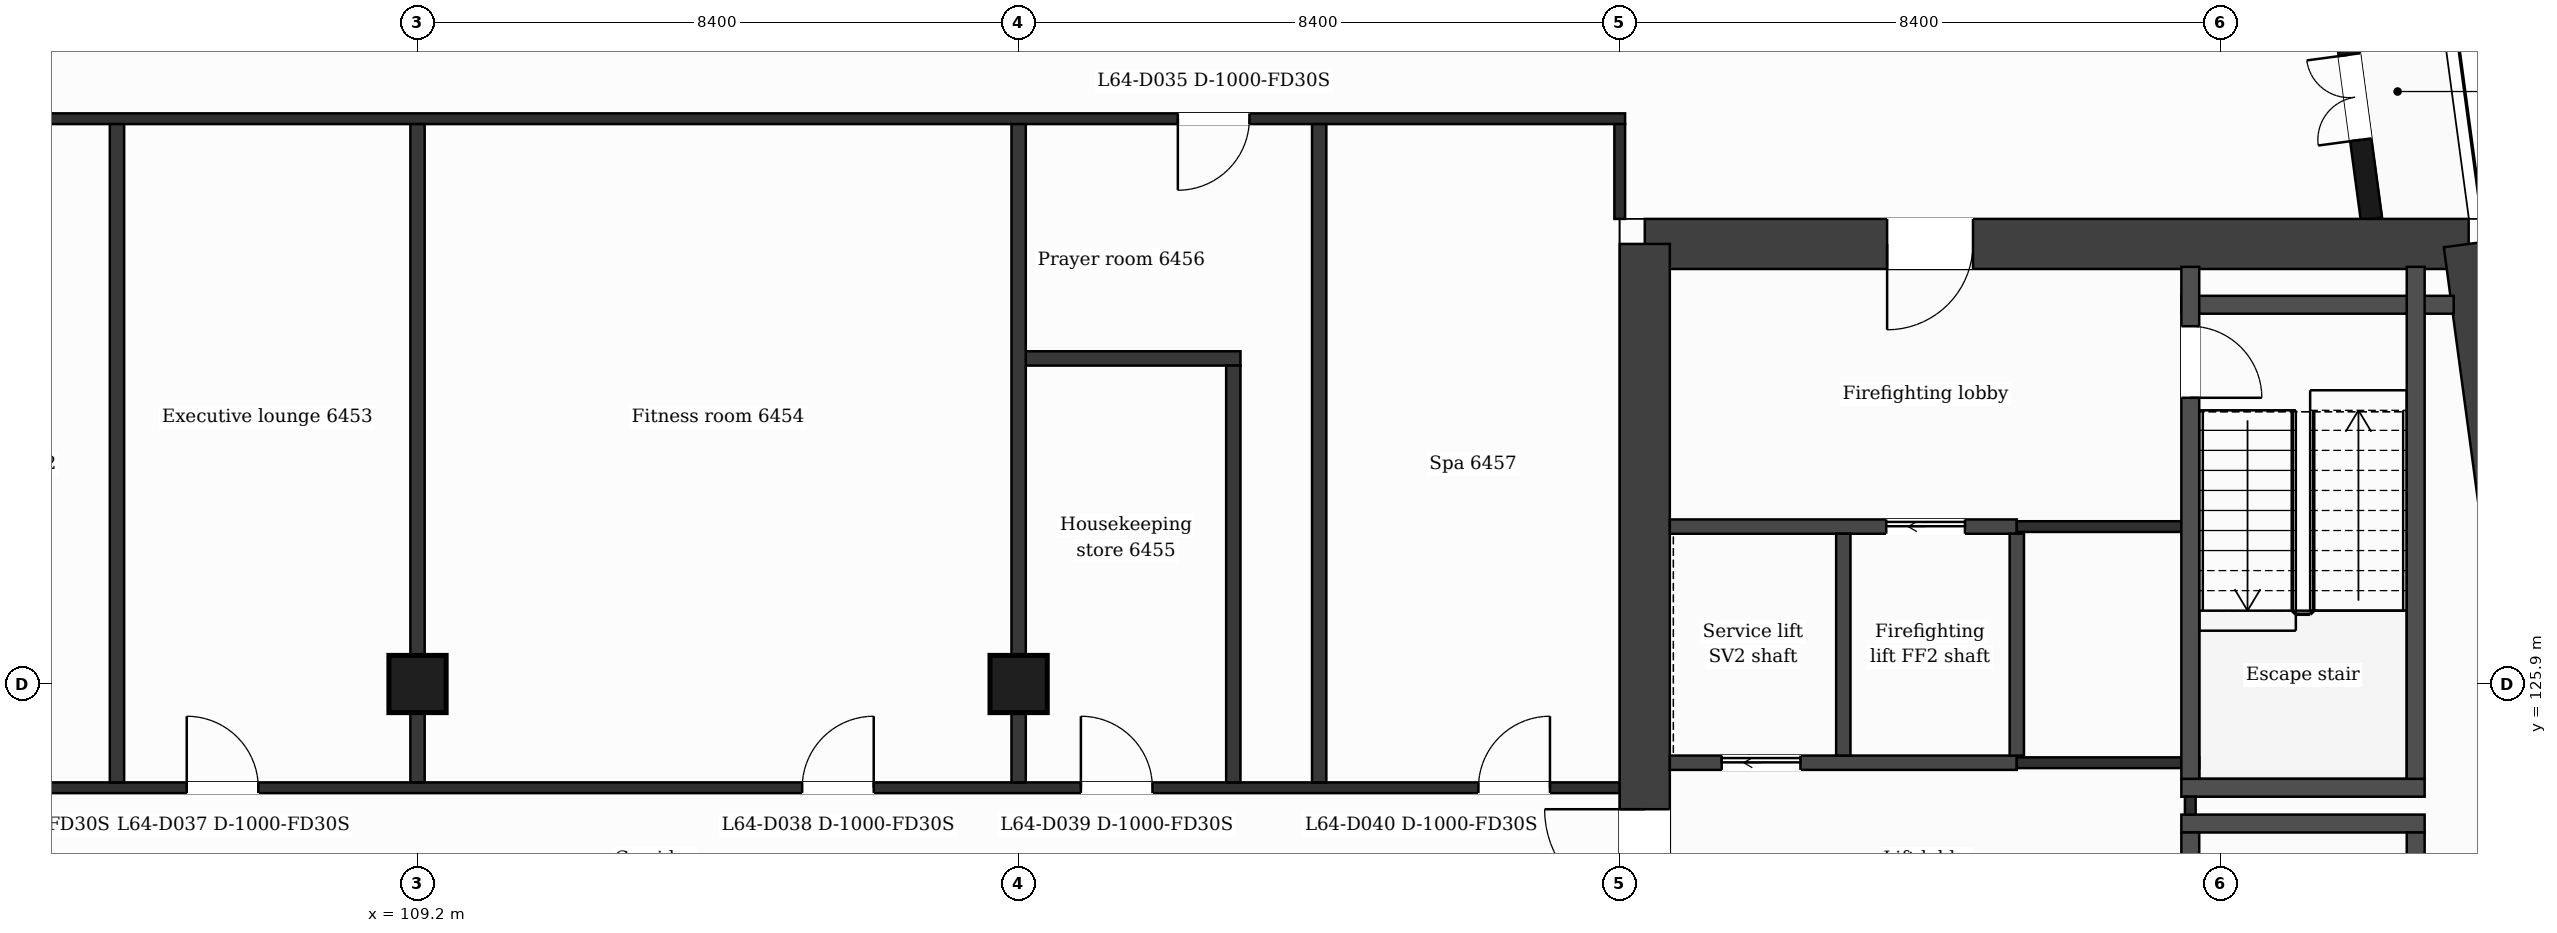
"""IFC4 building model, lengths in metres.
Left out: names, types, materials, properties, quantities, classifications, styles, units other than length and angle.
Written with IfcOpenShell. Run it as: python <this file> out.ifc"""

import sys

from ifc_helpers import new_model, si_unit, direction, frame, frame_2d, origin, origin_2d, place, context, subcontext, project, spatial, rectangle, extrude, element, fill, save


model = new_model("IFC4")
c1 = context("Model", 3, precision=1e-05, world=origin(), true_north=direction((0.0, 1.0)))
c2 = subcontext(c1, "Body", "Model", "MODEL_VIEW")
j1 = project(units=[si_unit("LENGTHUNIT", "METRE"), si_unit("PLANEANGLEUNIT", "RADIAN")], contexts=[c1])
p1 = place(None, origin())
s1 = spatial("IfcSite", under=j1, at=p1, CompositionType="ELEMENT")
p2 = place(p1, origin())
s2 = spatial("IfcBuilding", under=s1, at=p2, CompositionType="ELEMENT")
p3 = place(p2, frame((0.0, 0.0, 266.4)))
s3 = spatial("IfcBuildingStorey", under=s2, at=p3, CompositionType="ELEMENT", Elevation=266.4)
p4 = place(p3, frame((126.35, 132.05, 0.0), z_axis=(0.0, 0.0, 1.0), x_axis=(1.0, 0.0, 0.0)))
e1 = element("IfcWall", 1, at=p4, inside=s3, PredefinedType="SHEAR", context=c2, shape_type="SweptSolid", body=[
    extrude(rectangle(XDim=11.513, YDim=0.7, at=frame_2d((5.757, 0.0))), origin(), (0.0, 0.0, 1.0), 3.7),
])
p5 = place(p4, frame((3.386, 0.0, 0.0)))
e2 = element("IfcOpeningElement", 2, at=p5, cuts=e1, PredefinedType="OPENING", context=c2, shape_type="SweptSolid", body=[
    extrude(rectangle(XDim=1.2, YDim=2.1, at=frame_2d((0.6, 1.05))), frame((0.0, 0.36, 0.0), z_axis=(0.0, -1.0, 0.0), x_axis=(1.0, 0.0, 0.0)), (0.0, 0.0, 1.0), 0.72),
])
p6 = place(p3, frame((137.863, 132.05, 0.0), z_axis=(0.0, 0.0, 1.0), x_axis=(0.133406218907, -0.991061441464, 0.0)))
e3 = element("IfcWall", 3, at=p6, inside=s3, PredefinedType="SHEAR", context=c2, shape_type="SweptSolid", body=[
    extrude(rectangle(XDim=21.492, YDim=0.7, at=frame_2d((10.746, 0.0))), origin(), (0.0, 0.0, 1.0), 3.7),
])
p7 = place(p3, frame((126.35, 110.75, 0.0), z_axis=(0.0, 0.0, 1.0), x_axis=(0.0, 1.0, 0.0)))
e4 = element("IfcWall", 4, at=p7, inside=s3, PredefinedType="SHEAR", context=c2, shape_type="SweptSolid", body=[
    extrude(rectangle(XDim=21.3, YDim=0.7, at=frame_2d((10.65, 0.0))), origin(), (0.0, 0.0, 1.0), 3.7),
])
p8 = place(p7, frame((12.0, 0.0, 0.0)))
e5 = element("IfcOpeningElement", 5, at=p8, cuts=e4, PredefinedType="OPENING", context=c2, shape_type="SweptSolid", body=[
    extrude(rectangle(XDim=1.4, YDim=2.1, at=frame_2d((0.7, 1.05))), frame((0.0, 0.36, 0.0), z_axis=(0.0, -1.0, 0.0), x_axis=(1.0, 0.0, 0.0)), (0.0, 0.0, 1.0), 0.72),
])
for number, where, z_axis, x_axis in (
    (6, (109.2, 125.9, 0.0), (0.0, 0.0, 1.0), (1.0, 0.0, 0.0)),
    (7, (117.6, 125.9, 0.0), (0.0, 0.0, 1.0), (1.0, 0.0, 0.0)),
):
    element("IfcColumn", number, at=place(p3, frame(where, z_axis=z_axis, x_axis=x_axis)), inside=s3, PredefinedType="COLUMN", context=c2, shape_type="SweptSolid", body=[
        extrude(rectangle(XDim=0.8, YDim=0.8, at=origin_2d()), origin(), (0.0, 0.0, 1.0), 3.7),
    ])
p9 = place(p3, frame((136.504, 132.4, 0.0), z_axis=(0.0, 0.0, 1.0), x_axis=(-0.133399697462, 0.99106231929, 0.0)))
e8 = element("IfcWall", 8, at=p9, inside=s3, PredefinedType="SOLIDWALL", context=c2, shape_type="SweptSolid", body=[
    extrude(rectangle(XDim=6.74, YDim=0.3, at=frame_2d((3.37, 0.0))), origin(), (0.0, 0.0, 1.0), 3.38),
])
p10 = place(p9, frame((1.115, 0.0, 0.0)))
e9 = element("IfcOpeningElement", 9, at=p10, cuts=e8, PredefinedType="OPENING", context=c2, shape_type="SweptSolid", body=[
    extrude(rectangle(XDim=1.2, YDim=2.4, at=frame_2d((0.6, 1.2))), frame((0.0, 0.16, 0.0), z_axis=(0.0, -1.0, 0.0), x_axis=(1.0, 0.0, 0.0)), (0.0, 0.0, 1.0), 0.32),
])
p11 = place(p9, frame((3.835, 0.0, 0.9)))
e10 = element("IfcOpeningElement", 10, at=p11, cuts=e8, PredefinedType="OPENING", context=c2, shape_type="SweptSolid", body=[
    extrude(rectangle(XDim=2.4, YDim=2.1, at=frame_2d((1.2, 1.05))), frame((0.0, 0.16, 0.0), z_axis=(0.0, -1.0, 0.0), x_axis=(1.0, 0.0, 0.0)), (0.0, 0.0, 1.0), 0.32),
])
for number, where, z_axis, x_axis in (
    (11, (133.848, 123.95, 0.0), (0.0, 0.0, 1.0), (1.0, 0.0, 0.0)),
    (12, (133.848, 124.45, 0.0), (0.0, 0.0, 1.0), (1.0, 0.0, 0.0)),
):
    element("IfcWall", number, at=place(p3, frame(where, z_axis=z_axis, x_axis=x_axis)), inside=s3, PredefinedType="PARTITIONING", context=c2, shape_type="SweptSolid", body=[
        extrude(rectangle(XDim=3.4, YDim=0.25, at=frame_2d((1.7, 0.0))), origin(), (0.0, 0.0, 1.0), 3.38),
    ])
p12 = place(p3, frame((100.8, 124.45, 0.0), z_axis=(0.0, 0.0, 1.0), x_axis=(1.0, 0.0, 0.0)))
e13 = element("IfcWall", 13, at=p12, inside=s3, PredefinedType="PARTITIONING", context=c2, shape_type="SweptSolid", body=[
    extrude(rectangle(XDim=25.2, YDim=0.15, at=frame_2d((12.6, 0.0))), origin(), (0.0, 0.0, 1.0), 3.38),
])
p13 = place(p12, frame((0.975, 0.0, 0.0)))
e14 = element("IfcOpeningElement", 14, at=p13, cuts=e13, PredefinedType="OPENING", context=c2, shape_type="SweptSolid", body=[
    extrude(rectangle(XDim=1.0, YDim=2.1, at=frame_2d((0.5, 1.05))), frame((0.0, 0.085, 0.0), z_axis=(0.0, -1.0, 0.0), x_axis=(1.0, 0.0, 0.0)), (0.0, 0.0, 1.0), 0.17),
])
p14 = place(p12, frame((5.175, 0.0, 0.0)))
e15 = element("IfcOpeningElement", 15, at=p14, cuts=e13, PredefinedType="OPENING", context=c2, shape_type="SweptSolid", body=[
    extrude(rectangle(XDim=1.0, YDim=2.1, at=frame_2d((0.5, 1.05))), frame((0.0, 0.085, 0.0), z_axis=(0.0, -1.0, 0.0), x_axis=(1.0, 0.0, 0.0)), (0.0, 0.0, 1.0), 0.17),
])
p15 = place(p12, frame((13.775, 0.0, 0.0)))
e16 = element("IfcOpeningElement", 16, at=p15, cuts=e13, PredefinedType="OPENING", context=c2, shape_type="SweptSolid", body=[
    extrude(rectangle(XDim=1.0, YDim=2.1, at=frame_2d((0.5, 1.05))), frame((0.0, 0.085, 0.0), z_axis=(0.0, -1.0, 0.0), x_axis=(1.0, 0.0, 0.0)), (0.0, 0.0, 1.0), 0.17),
])
p16 = place(p12, frame((17.67, 0.0, 0.0)))
e17 = element("IfcOpeningElement", 17, at=p16, cuts=e13, PredefinedType="OPENING", context=c2, shape_type="SweptSolid", body=[
    extrude(rectangle(XDim=1.0, YDim=2.1, at=frame_2d((0.5, 1.05))), frame((0.0, 0.085, 0.0), z_axis=(0.0, -1.0, 0.0), x_axis=(1.0, 0.0, 0.0)), (0.0, 0.0, 1.0), 0.17),
])
p17 = place(p12, frame((23.225, 0.0, 0.0)))
e18 = element("IfcOpeningElement", 18, at=p17, cuts=e13, PredefinedType="OPENING", context=c2, shape_type="SweptSolid", body=[
    extrude(rectangle(XDim=1.0, YDim=2.1, at=frame_2d((0.5, 1.05))), frame((0.0, 0.085, 0.0), z_axis=(0.0, -1.0, 0.0), x_axis=(1.0, 0.0, 0.0)), (0.0, 0.0, 1.0), 0.17),
])
p18 = place(p3, frame((126.7, 124.8, 0.0), z_axis=(0.0, 0.0, 1.0), x_axis=(1.0, 0.0, 0.0)))
e19 = element("IfcWall", 19, at=p18, inside=s3, PredefinedType="PARTITIONING", context=c2, shape_type="SweptSolid", body=[
    extrude(rectangle(XDim=4.849, YDim=0.2, at=frame_2d((2.424, 0.0))), origin(), (0.0, 0.0, 1.0), 3.38),
])
p19 = place(p18, frame((0.725, 0.0, 0.0)))
e20 = element("IfcOpeningElement", 20, at=p19, cuts=e19, PredefinedType="OPENING", context=c2, shape_type="SweptSolid", body=[
    extrude(rectangle(XDim=1.1, YDim=2.1, at=frame_2d((0.55, 1.05))), frame((0.0, 0.11, 0.0), z_axis=(0.0, -1.0, 0.0), x_axis=(1.0, 0.0, 0.0)), (0.0, 0.0, 1.0), 0.22),
])
p20 = place(p3, frame((131.549, 124.8, 0.0), z_axis=(0.0, 0.0, 1.0), x_axis=(1.0, 0.0, 0.0)))
e21 = element("IfcWall", 21, at=p20, inside=s3, PredefinedType="PARTITIONING", context=c2, shape_type="SweptSolid", body=[
    extrude(rectangle(XDim=2.549, YDim=0.15, at=frame_2d((1.275, 0.0))), origin(), (0.0, 0.0, 1.0), 3.38),
])
p21 = place(p3, frame((126.7, 128.1, 0.0), z_axis=(0.0, 0.0, 1.0), x_axis=(1.0, 0.0, 0.0)))
e22 = element("IfcWall", 22, at=p21, inside=s3, PredefinedType="PARTITIONING", context=c2, shape_type="SweptSolid", body=[
    extrude(rectangle(XDim=4.849, YDim=0.2, at=frame_2d((2.424, 0.0))), origin(), (0.0, 0.0, 1.0), 3.38),
])
p22 = place(p21, frame((3.024, 0.0, 0.0)))
e23 = element("IfcOpeningElement", 23, at=p22, cuts=e22, PredefinedType="OPENING", context=c2, shape_type="SweptSolid", body=[
    extrude(rectangle(XDim=1.1, YDim=2.1, at=frame_2d((0.55, 1.05))), frame((0.0, 0.11, 0.0), z_axis=(0.0, -1.0, 0.0), x_axis=(1.0, 0.0, 0.0)), (0.0, 0.0, 1.0), 0.22),
])
p23 = place(p3, frame((131.549, 128.1, 0.0), z_axis=(0.0, 0.0, 1.0), x_axis=(1.0, 0.0, 0.0)))
e24 = element("IfcWall", 24, at=p23, inside=s3, PredefinedType="PARTITIONING", context=c2, shape_type="SweptSolid", body=[
    extrude(rectangle(XDim=2.424, YDim=0.15, at=frame_2d((1.212, 0.0))), origin(), (0.0, 0.0, 1.0), 3.38),
])
p24 = place(p3, frame((117.6, 130.45, 0.0), z_axis=(0.0, 0.0, 1.0), x_axis=(1.0, 0.0, 0.0)))
e25 = element("IfcWall", 25, at=p24, inside=s3, PredefinedType="PARTITIONING", context=c2, shape_type="SweptSolid", body=[
    extrude(rectangle(XDim=3.1, YDim=0.2, at=frame_2d((1.55, 0.0))), origin(), (0.0, 0.0, 1.0), 3.38),
])
p25 = place(p3, frame((133.848, 131.2, 0.0), z_axis=(0.0, 0.0, 1.0), x_axis=(1.0, 0.0, 0.0)))
e26 = element("IfcWall", 26, at=p25, inside=s3, PredefinedType="PARTITIONING", context=c2, shape_type="SweptSolid", body=[
    extrude(rectangle(XDim=3.807, YDim=0.25, at=frame_2d((1.903, 0.0))), origin(), (0.0, 0.0, 1.0), 3.38),
])
p26 = place(p3, frame((100.725, 133.8, 0.0), z_axis=(0.0, 0.0, 1.0), x_axis=(1.0, 0.0, 0.0)))
e27 = element("IfcWall", 27, at=p26, inside=s3, PredefinedType="PARTITIONING", context=c2, shape_type="SweptSolid", body=[
    extrude(rectangle(XDim=25.35, YDim=0.15, at=frame_2d((12.675, 0.0))), origin(), (0.0, 0.0, 1.0), 3.38),
])
p27 = place(p26, frame((19.1, 0.0, 0.0)))
e28 = element("IfcOpeningElement", 28, at=p27, cuts=e27, PredefinedType="OPENING", context=c2, shape_type="SweptSolid", body=[
    extrude(rectangle(XDim=1.0, YDim=2.1, at=frame_2d((0.5, 1.05))), frame((0.0, 0.085, 0.0), z_axis=(0.0, -1.0, 0.0), x_axis=(1.0, 0.0, 0.0)), (0.0, 0.0, 1.0), 0.17),
])
for number, where, z_axis, x_axis in (
    (29, (105.0, 124.525, 0.0), (0.0, 0.0, 1.0), (0.0, 1.0, 0.0)),
    (30, (109.2, 124.525, 0.0), (0.0, 0.0, 1.0), (0.0, 1.0, 0.0)),
    (31, (117.6, 124.525, 0.0), (0.0, 0.0, 1.0), (0.0, 1.0, 0.0)),
):
    element("IfcWall", number, at=place(p3, frame(where, z_axis=z_axis, x_axis=x_axis)), inside=s3, PredefinedType="PARTITIONING", context=c2, shape_type="SweptSolid", body=[
        extrude(rectangle(XDim=9.2, YDim=0.2, at=frame_2d((4.6, 0.0))), origin(), (0.0, 0.0, 1.0), 3.38),
    ])
p28 = place(p3, frame((120.6, 124.525, 0.0), z_axis=(0.0, 0.0, 1.0), x_axis=(0.0, 1.0, 0.0)))
e32 = element("IfcWall", 32, at=p28, inside=s3, PredefinedType="PARTITIONING", context=c2, shape_type="SweptSolid", body=[
    extrude(rectangle(XDim=5.825, YDim=0.2, at=frame_2d((2.913, 0.0))), origin(), (0.0, 0.0, 1.0), 3.38),
])
p29 = place(p3, frame((121.8, 124.525, 0.0), z_axis=(0.0, 0.0, 1.0), x_axis=(0.0, 1.0, 0.0)))
e33 = element("IfcWall", 33, at=p29, inside=s3, PredefinedType="PARTITIONING", context=c2, shape_type="SweptSolid", body=[
    extrude(rectangle(XDim=9.2, YDim=0.2, at=frame_2d((4.6, 0.0))), origin(), (0.0, 0.0, 1.0), 3.38),
])
p30 = place(p3, frame((126.0, 132.4, 0.0), z_axis=(0.0, 0.0, 1.0), x_axis=(0.0, 1.0, 0.0)))
e34 = element("IfcWall", 34, at=p30, inside=s3, PredefinedType="PARTITIONING", context=c2, shape_type="SweptSolid", body=[
    extrude(rectangle(XDim=1.325, YDim=0.15, at=frame_2d((0.663, 0.0))), origin(), (0.0, 0.0, 1.0), 3.38),
])
for number, where, z_axis, x_axis in (
    (35, (129.124, 124.9, 0.0), (0.0, 0.0, 1.0), (0.0, 1.0, 0.0)),
    (36, (131.549, 124.9, 0.0), (0.0, 0.0, 1.0), (0.0, 1.0, 0.0)),
):
    element("IfcWall", number, at=place(p3, frame(where, z_axis=z_axis, x_axis=x_axis)), inside=s3, PredefinedType="PARTITIONING", context=c2, shape_type="SweptSolid", body=[
        extrude(rectangle(XDim=3.1, YDim=0.2, at=frame_2d((1.55, 0.0))), origin(), (0.0, 0.0, 1.0), 3.38),
    ])
p31 = place(p3, frame((133.973, 124.075, 0.0), z_axis=(0.0, 0.0, 1.0), x_axis=(0.0, 1.0, 0.0)))
e37 = element("IfcWall", 37, at=p31, inside=s3, PredefinedType="PARTITIONING", context=c2, shape_type="SweptSolid", body=[
    extrude(rectangle(XDim=0.25, YDim=0.15, at=frame_2d((0.125, 0.0))), origin(), (0.0, 0.0, 1.0), 3.38),
])
p32 = place(p3, frame((133.973, 116.67, 0.0), z_axis=(0.0, 0.0, 1.0), x_axis=(0.0, 1.0, 0.0)))
e38 = element("IfcWall", 38, at=p32, inside=s3, PredefinedType="PARTITIONING", context=c2, shape_type="SweptSolid", body=[
    extrude(rectangle(XDim=7.155, YDim=0.25, at=frame_2d((3.578, 0.0))), origin(), (0.0, 0.0, 1.0), 3.38),
])
p33 = place(p32, frame((5.855, 0.0, 0.0)))
e39 = element("IfcOpeningElement", 39, at=p33, cuts=e38, PredefinedType="OPENING", context=c2, shape_type="SweptSolid", body=[
    extrude(rectangle(XDim=0.95, YDim=2.1, at=frame_2d((0.475, 1.05))), frame((0.0, 0.135, 0.0), z_axis=(0.0, -1.0, 0.0), x_axis=(1.0, 0.0, 0.0)), (0.0, 0.0, 1.0), 0.27),
])
p34 = place(p3, frame((133.973, 124.575, 0.0), z_axis=(0.0, 0.0, 1.0), x_axis=(0.0, 1.0, 0.0)))
e40 = element("IfcWall", 40, at=p34, inside=s3, PredefinedType="PARTITIONING", context=c2, shape_type="SweptSolid", body=[
    extrude(rectangle(XDim=7.155, YDim=0.25, at=frame_2d((3.578, 0.0))), origin(), (0.0, 0.0, 1.0), 3.38),
])
p35 = place(p34, frame((5.325, 0.0, 0.0)))
e41 = element("IfcOpeningElement", 41, at=p35, cuts=e40, PredefinedType="OPENING", context=c2, shape_type="SweptSolid", body=[
    extrude(rectangle(XDim=1.0, YDim=2.1, at=frame_2d((0.5, 1.05))), frame((0.0, 0.135, 0.0), z_axis=(0.0, -1.0, 0.0), x_axis=(1.0, 0.0, 0.0)), (0.0, 0.0, 1.0), 0.27),
])
for number, where, z_axis, x_axis in (
    (42, (137.123, 116.67, 0.0), (0.0, 0.0, 1.0), (0.0, 1.0, 0.0)),
    (43, (137.123, 124.575, 0.0), (0.0, 0.0, 1.0), (0.0, 1.0, 0.0)),
):
    element("IfcWall", number, at=place(p3, frame(where, z_axis=z_axis, x_axis=x_axis)), inside=s3, PredefinedType="PARTITIONING", context=c2, shape_type="SweptSolid", body=[
        extrude(rectangle(XDim=7.155, YDim=0.25, at=frame_2d((3.578, 0.0))), origin(), (0.0, 0.0, 1.0), 3.38),
    ])
p36 = place(p10, origin())
e44 = element("IfcDoor", 44, at=p36, inside=s3, OperationType="DOUBLE_DOOR_SINGLE_SWING", PredefinedType="DOOR", context=c2, shape_type="SweptSolid", body=[
    extrude(rectangle(XDim=1.2, YDim=2.4, at=frame_2d((0.6, 1.2))), frame((0.0, 0.025, 0.0), z_axis=(0.0, -1.0, 0.0), x_axis=(1.0, 0.0, 0.0)), (0.0, 0.0, 1.0), 0.05),
])
fill(e9, e44)
p37 = place(p22, origin())
e45 = element("IfcDoor", 45, at=p37, inside=s3, OperationType="SLIDING_TO_LEFT", PredefinedType="DOOR", context=c2, shape_type="SweptSolid", body=[
    extrude(rectangle(XDim=1.1, YDim=2.1, at=frame_2d((0.55, 1.05))), frame((0.0, 0.025, 0.0), z_axis=(0.0, -1.0, 0.0), x_axis=(1.0, 0.0, 0.0)), (0.0, 0.0, 1.0), 0.05),
])
fill(e23, e45)
p38 = place(p19, origin())
e46 = element("IfcDoor", 46, at=p38, inside=s3, OperationType="SLIDING_TO_LEFT", PredefinedType="DOOR", context=c2, shape_type="SweptSolid", body=[
    extrude(rectangle(XDim=1.1, YDim=2.1, at=frame_2d((0.55, 1.05))), frame((0.0, 0.025, 0.0), z_axis=(0.0, -1.0, 0.0), x_axis=(1.0, 0.0, 0.0)), (0.0, 0.0, 1.0), 0.05),
])
fill(e20, e46)
p39 = place(p35, origin())
e47 = element("IfcDoor", 47, at=p39, inside=s3, OperationType="SINGLE_SWING_LEFT", PredefinedType="DOOR", context=c2, shape_type="SweptSolid", body=[
    extrude(rectangle(XDim=1.0, YDim=2.1, at=frame_2d((0.5, 1.05))), frame((0.0, 0.025, 0.0), z_axis=(0.0, -1.0, 0.0), x_axis=(1.0, 0.0, 0.0)), (0.0, 0.0, 1.0), 0.05),
])
fill(e41, e47)
p40 = place(p27, origin())
e48 = element("IfcDoor", 48, at=p40, inside=s3, OperationType="SINGLE_SWING_LEFT", PredefinedType="DOOR", context=c2, shape_type="SweptSolid", body=[
    extrude(rectangle(XDim=1.0, YDim=2.1, at=frame_2d((0.5, 1.05))), frame((0.0, 0.025, 0.0), z_axis=(0.0, -1.0, 0.0), x_axis=(1.0, 0.0, 0.0)), (0.0, 0.0, 1.0), 0.05),
])
fill(e28, e48)
p41 = place(p14, origin())
e49 = element("IfcDoor", 49, at=p41, inside=s3, OperationType="SINGLE_SWING_LEFT", PredefinedType="DOOR", context=c2, shape_type="SweptSolid", body=[
    extrude(rectangle(XDim=1.0, YDim=2.1, at=frame_2d((0.5, 1.05))), frame((0.0, 0.025, 0.0), z_axis=(0.0, -1.0, 0.0), x_axis=(1.0, 0.0, 0.0)), (0.0, 0.0, 1.0), 0.05),
])
fill(e15, e49)
p42 = place(p15, origin())
e50 = element("IfcDoor", 50, at=p42, inside=s3, OperationType="SINGLE_SWING_RIGHT", PredefinedType="DOOR", context=c2, shape_type="SweptSolid", body=[
    extrude(rectangle(XDim=1.0, YDim=2.1, at=frame_2d((0.5, 1.05))), frame((0.0, 0.025, 0.0), z_axis=(0.0, -1.0, 0.0), x_axis=(1.0, 0.0, 0.0)), (0.0, 0.0, 1.0), 0.05),
])
fill(e16, e50)
p43 = place(p16, origin())
e51 = element("IfcDoor", 51, at=p43, inside=s3, OperationType="SINGLE_SWING_LEFT", PredefinedType="DOOR", context=c2, shape_type="SweptSolid", body=[
    extrude(rectangle(XDim=1.0, YDim=2.1, at=frame_2d((0.5, 1.05))), frame((0.0, 0.025, 0.0), z_axis=(0.0, -1.0, 0.0), x_axis=(1.0, 0.0, 0.0)), (0.0, 0.0, 1.0), 0.05),
])
fill(e17, e51)
p44 = place(p17, origin())
e52 = element("IfcDoor", 52, at=p44, inside=s3, OperationType="SINGLE_SWING_RIGHT", PredefinedType="DOOR", context=c2, shape_type="SweptSolid", body=[
    extrude(rectangle(XDim=1.0, YDim=2.1, at=frame_2d((0.5, 1.05))), frame((0.0, 0.025, 0.0), z_axis=(0.0, -1.0, 0.0), x_axis=(1.0, 0.0, 0.0)), (0.0, 0.0, 1.0), 0.05),
])
fill(e18, e52)
p45 = place(p5, origin())
e53 = element("IfcDoor", 53, at=p45, inside=s3, OperationType="SINGLE_SWING_LEFT", PredefinedType="DOOR", context=c2, shape_type="SweptSolid", body=[
    extrude(rectangle(XDim=1.2, YDim=2.1, at=frame_2d((0.6, 1.05))), frame((0.0, 0.025, 0.0), z_axis=(0.0, -1.0, 0.0), x_axis=(1.0, 0.0, 0.0)), (0.0, 0.0, 1.0), 0.05),
])
fill(e2, e53)
p46 = place(p8, origin())
e54 = element("IfcDoor", 54, at=p46, inside=s3, OperationType="SINGLE_SWING_RIGHT", PredefinedType="DOOR", context=c2, shape_type="SweptSolid", body=[
    extrude(rectangle(XDim=1.4, YDim=2.1, at=frame_2d((0.7, 1.05))), frame((0.0, 0.025, 0.0), z_axis=(0.0, -1.0, 0.0), x_axis=(1.0, 0.0, 0.0)), (0.0, 0.0, 1.0), 0.05),
])
fill(e5, e54)
save(model, sys.argv[1])
